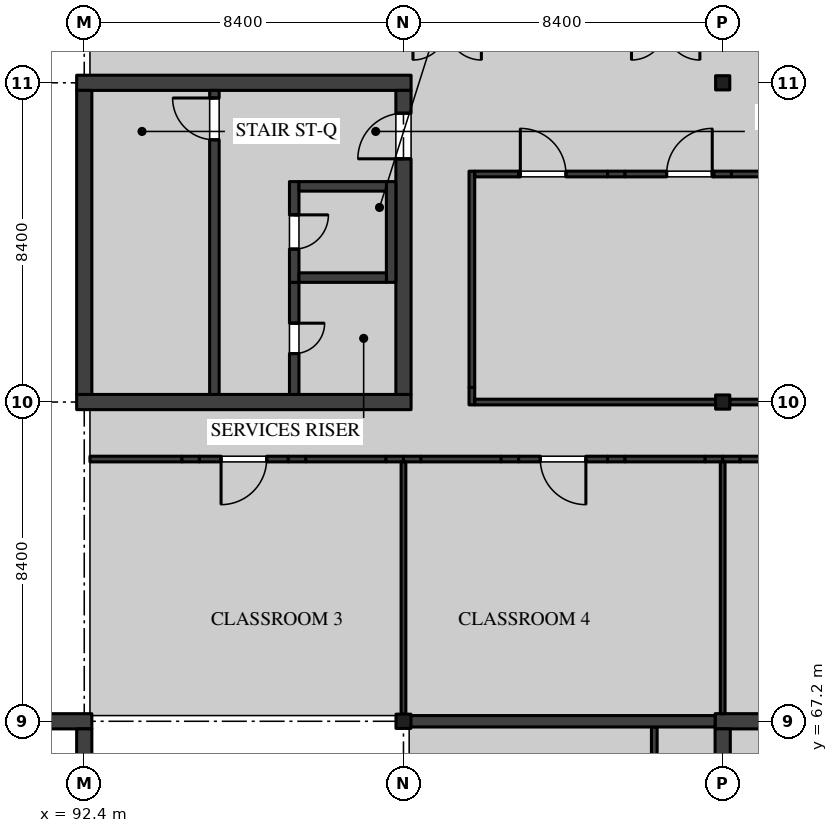
"""IFC4 building model, lengths in metres.
Left out: names, types, materials, properties, quantities, classifications, styles, units other than length and angle.
Written with IfcOpenShell. Run it as: python <this file> out.ifc"""

import sys

from ifc_helpers import new_model, si_unit, direction, frame, frame_2d, origin, origin_2d, place, context, subcontext, project, spatial, rectangle, i_section, extrude, element, fill, save


model = new_model("IFC4")
c1 = context("Model", 3, precision=1e-05, world=origin(), true_north=direction((0.0, 1.0)))
c2 = subcontext(c1, "Body", "Model", "MODEL_VIEW")
j1 = project(units=[si_unit("LENGTHUNIT", "METRE"), si_unit("PLANEANGLEUNIT", "RADIAN")], contexts=[c1])
p1 = place(None, origin())
s1 = spatial("IfcSite", under=j1, at=p1, CompositionType="ELEMENT")
p2 = place(p1, origin())
s2 = spatial("IfcBuilding", under=s1, at=p2, CompositionType="ELEMENT")
p3 = place(p2, frame((0.0, 0.0, 9.9)))
s3 = spatial("IfcBuildingStorey", under=s2, at=p3, CompositionType="ELEMENT", Elevation=9.9)
p4 = place(p3, frame((100.8, 67.2, 0.0), z_axis=(0.0, 0.0, 1.0), x_axis=(1.0, 0.0, 0.0)))
e1 = element("IfcColumn", 1, at=p4, inside=s3, PredefinedType="COLUMN", context=c2, shape_type="SweptSolid", body=[
    extrude(i_section(OverallWidth=0.394, OverallDepth=0.376, WebThickness=0.017, FlangeThickness=0.028, FilletRadius=0.015, at=origin_2d()), origin(), (0.0, 0.0, 1.0), 4.37),
])
for number, where, z_axis, x_axis in (
    (2, (109.2, 75.6, 0.0), (0.0, 0.0, 1.0), (1.0, 0.0, 0.0)),
    (3, (109.2, 84.0, 0.0), (0.0, 0.0, 1.0), (1.0, 0.0, 0.0)),
):
    element("IfcColumn", number, at=place(p3, frame(where, z_axis=z_axis, x_axis=x_axis)), inside=s3, PredefinedType="COLUMN", context=c2, shape_type="SweptSolid", body=[
        extrude(i_section(OverallWidth=0.373, OverallDepth=0.373, WebThickness=0.016, FlangeThickness=0.026, FilletRadius=0.015, at=origin_2d()), origin(), (0.0, 0.0, 1.0), 4.37),
    ])
p5 = place(p3, frame((83.8, 67.2, 0.0), z_axis=(0.0, 0.0, 1.0), x_axis=(1.0, 0.0, 0.0)))
e4 = element("IfcWall", 4, at=p5, inside=s3, PredefinedType="SHEAR", context=c2, shape_type="SweptSolid", body=[
    extrude(rectangle(XDim=8.8, YDim=0.4, at=frame_2d((4.4, 0.0))), origin(), (0.0, 0.0, 1.0), 4.5),
])
p6 = place(p3, frame((92.4, 59.0, 0.0), z_axis=(0.0, 0.0, 1.0), x_axis=(0.0, 1.0, 0.0)))
e5 = element("IfcWall", 5, at=p6, inside=s3, PredefinedType="SHEAR", context=c2, shape_type="SweptSolid", body=[
    extrude(rectangle(XDim=8.0, YDim=0.4, at=frame_2d((4.0, 0.0))), origin(), (0.0, 0.0, 1.0), 4.5),
])
p7 = place(p3, frame((109.0, 67.2, 0.0), z_axis=(0.0, 0.0, 1.0), x_axis=(1.0, 0.0, 0.0)))
e6 = element("IfcWall", 6, at=p7, inside=s3, PredefinedType="SHEAR", context=c2, shape_type="SweptSolid", body=[
    extrude(rectangle(XDim=8.8, YDim=0.4, at=frame_2d((4.4, 0.0))), origin(), (0.0, 0.0, 1.0), 4.37),
])
p8 = place(p3, frame((109.2, 59.0, 0.0), z_axis=(0.0, 0.0, 1.0), x_axis=(0.0, 1.0, 0.0)))
e7 = element("IfcWall", 7, at=p8, inside=s3, PredefinedType="SHEAR", context=c2, shape_type="SweptSolid", body=[
    extrude(rectangle(XDim=8.0, YDim=0.4, at=frame_2d((4.0, 0.0))), origin(), (0.0, 0.0, 1.0), 4.37),
])
p9 = place(p8, frame((2.925, 0.0, 0.0)))
e8 = element("IfcOpeningElement", 8, at=p9, cuts=e7, PredefinedType="OPENING", context=c2, shape_type="SweptSolid", body=[
    extrude(rectangle(XDim=1.2, YDim=2.1, at=frame_2d((0.6, 1.05))), frame((0.0, 0.21, 0.0), z_axis=(0.0, -1.0, 0.0), x_axis=(1.0, 0.0, 0.0)), (0.0, 0.0, 1.0), 0.42),
])
for number, where, z_axis, x_axis in (
    (9, (92.2, 75.6, 0.0), (0.0, 0.0, 1.0), (1.0, 0.0, 0.0)),
    (10, (92.2, 84.0, 0.0), (0.0, 0.0, 1.0), (1.0, 0.0, 0.0)),
):
    element("IfcWall", number, at=place(p3, frame(where, z_axis=z_axis, x_axis=x_axis)), inside=s3, PredefinedType="SHEAR", context=c2, shape_type="SweptSolid", body=[
        extrude(rectangle(XDim=8.8, YDim=0.4, at=frame_2d((4.4, 0.0))), origin(), (0.0, 0.0, 1.0), 4.37),
    ])
p10 = place(p3, frame((92.4, 75.8, 0.0), z_axis=(0.0, 0.0, 1.0), x_axis=(0.0, 1.0, 0.0)))
e11 = element("IfcWall", 11, at=p10, inside=s3, PredefinedType="SHEAR", context=c2, shape_type="SweptSolid", body=[
    extrude(rectangle(XDim=8.0, YDim=0.4, at=frame_2d((4.0, 0.0))), origin(), (0.0, 0.0, 1.0), 4.37),
])
p11 = place(p3, frame((100.8, 75.8, 0.0), z_axis=(0.0, 0.0, 1.0), x_axis=(0.0, 1.0, 0.0)))
e12 = element("IfcWall", 12, at=p11, inside=s3, PredefinedType="SHEAR", context=c2, shape_type="SweptSolid", body=[
    extrude(rectangle(XDim=8.0, YDim=0.4, at=frame_2d((4.0, 0.0))), origin(), (0.0, 0.0, 1.0), 4.37),
])
p12 = place(p11, frame((6.2, 0.0, 0.0)))
e13 = element("IfcOpeningElement", 13, at=p12, cuts=e12, PredefinedType="OPENING", context=c2, shape_type="SweptSolid", body=[
    extrude(rectangle(XDim=1.2, YDim=2.1, at=frame_2d((0.6, 1.05))), frame((0.0, 0.21, 0.0), z_axis=(0.0, -1.0, 0.0), x_axis=(1.0, 0.0, 0.0)), (0.0, 0.0, 1.0), 0.42),
])
p13 = place(p3, frame((95.825, 83.8, 0.0), z_axis=(0.0, 0.0, 1.0), x_axis=(0.0, -1.0, 0.0)))
e14 = element("IfcWall", 14, at=p13, inside=s3, PredefinedType="SOLIDWALL", context=c2, shape_type="SweptSolid", body=[
    extrude(rectangle(XDim=8.0, YDim=0.25, at=frame_2d((4.0, 0.0))), origin(), (0.0, 0.0, 1.0), 4.37),
])
p14 = place(p13, frame((0.2, 0.0, 0.0)))
e15 = element("IfcOpeningElement", 15, at=p14, cuts=e14, PredefinedType="OPENING", context=c2, shape_type="SweptSolid", body=[
    extrude(rectangle(XDim=1.1, YDim=2.1, at=frame_2d((0.55, 1.05))), frame((0.0, 0.135, 0.0), z_axis=(0.0, -1.0, 0.0), x_axis=(1.0, 0.0, 0.0)), (0.0, 0.0, 1.0), 0.27),
])
p15 = place(p3, frame((97.925, 78.75, 0.0), z_axis=(0.0, 0.0, 1.0), x_axis=(0.0, -1.0, 0.0)))
e16 = element("IfcWall", 16, at=p15, inside=s3, PredefinedType="SOLIDWALL", context=c2, shape_type="SweptSolid", body=[
    extrude(rectangle(XDim=2.95, YDim=0.25, at=frame_2d((1.475, 0.0))), origin(), (0.0, 0.0, 1.0), 4.37),
])
p16 = place(p15, frame((1.075, 0.0, 0.0)))
e17 = element("IfcOpeningElement", 17, at=p16, cuts=e16, PredefinedType="OPENING", context=c2, shape_type="SweptSolid", body=[
    extrude(rectangle(XDim=0.8, YDim=2.1, at=frame_2d((0.4, 1.05))), frame((0.0, 0.135, 0.0), z_axis=(0.0, -1.0, 0.0), x_axis=(1.0, 0.0, 0.0)), (0.0, 0.0, 1.0), 0.27),
])
p17 = place(p3, frame((97.925, 81.4, 0.0), z_axis=(0.0, 0.0, 1.0), x_axis=(0.0, -1.0, 0.0)))
e18 = element("IfcWall", 18, at=p17, inside=s3, PredefinedType="SOLIDWALL", context=c2, shape_type="SweptSolid", body=[
    extrude(rectangle(XDim=2.65, YDim=0.25, at=frame_2d((1.325, 0.0))), origin(), (0.0, 0.0, 1.0), 4.37),
])
p18 = place(p17, frame((0.875, 0.0, 0.0)))
e19 = element("IfcOpeningElement", 19, at=p18, cuts=e18, PredefinedType="OPENING", context=c2, shape_type="SweptSolid", body=[
    extrude(rectangle(XDim=0.9, YDim=2.1, at=frame_2d((0.45, 1.05))), frame((0.0, 0.135, 0.0), z_axis=(0.0, -1.0, 0.0), x_axis=(1.0, 0.0, 0.0)), (0.0, 0.0, 1.0), 0.27),
])
p19 = place(p3, frame((100.475, 81.4, 0.0), z_axis=(0.0, 0.0, 1.0), x_axis=(0.0, -1.0, 0.0)))
e20 = element("IfcWall", 20, at=p19, inside=s3, PredefinedType="SOLIDWALL", context=c2, shape_type="SweptSolid", body=[
    extrude(rectangle(XDim=2.65, YDim=0.25, at=frame_2d((1.325, 0.0))), origin(), (0.0, 0.0, 1.0), 4.37),
])
for number, where, z_axis, x_axis in (
    (21, (98.05, 81.275, 0.0), (0.0, 0.0, 1.0), (1.0, 0.0, 0.0)),
    (22, (98.05, 78.875, 0.0), (0.0, 0.0, 1.0), (1.0, 0.0, 0.0)),
):
    element("IfcWall", number, at=place(p3, frame(where, z_axis=z_axis, x_axis=x_axis)), inside=s3, PredefinedType="SOLIDWALL", context=c2, shape_type="SweptSolid", body=[
        extrude(rectangle(XDim=2.3, YDim=0.25, at=frame_2d((1.15, 0.0))), origin(), (0.0, 0.0, 1.0), 4.37),
    ])
p20 = place(p3, frame((107.4, 59.03, 0.0), z_axis=(0.0, 0.0, 1.0), x_axis=(0.0, 1.0, 0.0)))
e23 = element("IfcWall", 23, at=p20, inside=s3, PredefinedType="PARTITIONING", context=c2, shape_type="SweptSolid", body=[
    extrude(rectangle(XDim=8.02, YDim=0.15, at=frame_2d((4.01, 0.0))), origin(), (0.0, 0.0, 1.0), 4.37),
])
p21 = place(p3, frame((102.6, 75.525, 0.0), z_axis=(0.0, 0.0, 1.0), x_axis=(0.0, 1.0, 0.0)))
e24 = element("IfcWall", 24, at=p21, inside=s3, PredefinedType="PARTITIONING", context=c2, shape_type="SweptSolid", body=[
    extrude(rectangle(XDim=0.46, YDim=0.15, at=frame_2d((0.23, 0.0))), origin(), (0.0, 0.0, 1.0), 3.746),
])
p22 = place(p3, frame((102.6, 75.985, 0.0), z_axis=(0.0, 0.0, 1.0), x_axis=(0.0, 1.0, 0.0)))
e25 = element("IfcWall", 25, at=p22, inside=s3, PredefinedType="PARTITIONING", context=c2, shape_type="SweptSolid", body=[
    extrude(rectangle(XDim=5.69, YDim=0.15, at=frame_2d((2.845, 0.0))), origin(), (0.0, 0.0, 1.0), 4.37),
])
p23 = place(p3, frame((102.675, 75.6, 0.0), z_axis=(0.0, 0.0, 1.0), x_axis=(1.0, 0.0, 0.0)))
e26 = element("IfcWall", 26, at=p23, inside=s3, PredefinedType="PARTITIONING", context=c2, shape_type="SweptSolid", body=[
    extrude(rectangle(XDim=6.339, YDim=0.15, at=frame_2d((3.169, 0.0))), origin(), (0.0, 0.0, 1.0), 3.746),
])
p24 = place(p3, frame((109.386, 75.6, 0.0), z_axis=(0.0, 0.0, 1.0), x_axis=(1.0, 0.0, 0.0)))
e27 = element("IfcWall", 27, at=p24, inside=s3, PredefinedType="PARTITIONING", context=c2, shape_type="SweptSolid", body=[
    extrude(rectangle(XDim=6.414, YDim=0.15, at=frame_2d((3.207, 0.0))), origin(), (0.0, 0.0, 1.0), 3.746),
])
p25 = place(p3, frame((102.675, 81.6, 0.0), z_axis=(0.0, 0.0, 1.0), x_axis=(1.0, 0.0, 0.0)))
e28 = element("IfcWall", 28, at=p25, inside=s3, PredefinedType="PARTITIONING", context=c2, shape_type="SweptSolid", body=[
    extrude(rectangle(XDim=1.155, YDim=0.15, at=frame_2d((0.578, 0.0))), origin(), (0.0, 0.0, 1.0), 3.895),
])
p26 = place(p3, frame((103.83, 81.6, 0.0), z_axis=(0.0, 0.0, 1.0), x_axis=(1.0, 0.0, 0.0)))
e29 = element("IfcWall", 29, at=p26, inside=s3, PredefinedType="PARTITIONING", context=c2, shape_type="SweptSolid", body=[
    extrude(rectangle(XDim=2.34, YDim=0.15, at=frame_2d((1.17, 0.0))), origin(), (0.0, 0.0, 1.0), 4.37),
])
p27 = place(p26, frame((0.045, 0.0, 0.0)))
e30 = element("IfcOpeningElement", 30, at=p27, cuts=e29, PredefinedType="OPENING", context=c2, shape_type="SweptSolid", body=[
    extrude(rectangle(XDim=1.2, YDim=2.4, at=frame_2d((0.6, 1.2))), frame((0.0, 0.085, 0.0), z_axis=(0.0, -1.0, 0.0), x_axis=(1.0, 0.0, 0.0)), (0.0, 0.0, 1.0), 0.17),
])
p28 = place(p3, frame((106.17, 81.6, 0.0), z_axis=(0.0, 0.0, 1.0), x_axis=(1.0, 0.0, 0.0)))
e31 = element("IfcWall", 31, at=p28, inside=s3, PredefinedType="PARTITIONING", context=c2, shape_type="SweptSolid", body=[
    extrude(rectangle(XDim=0.46, YDim=0.15, at=frame_2d((0.23, 0.0))), origin(), (0.0, 0.0, 1.0), 3.895),
])
p29 = place(p3, frame((106.63, 81.6, 0.0), z_axis=(0.0, 0.0, 1.0), x_axis=(1.0, 0.0, 0.0)))
e32 = element("IfcWall", 32, at=p29, inside=s3, PredefinedType="PARTITIONING", context=c2, shape_type="SweptSolid", body=[
    extrude(rectangle(XDim=2.34, YDim=0.15, at=frame_2d((1.17, 0.0))), origin(), (0.0, 0.0, 1.0), 4.37),
])
p30 = place(p29, frame((1.095, 0.0, 0.0)))
e33 = element("IfcOpeningElement", 33, at=p30, cuts=e32, PredefinedType="OPENING", context=c2, shape_type="SweptSolid", body=[
    extrude(rectangle(XDim=1.2, YDim=2.4, at=frame_2d((0.6, 1.2))), frame((0.0, 0.085, 0.0), z_axis=(0.0, -1.0, 0.0), x_axis=(1.0, 0.0, 0.0)), (0.0, 0.0, 1.0), 0.17),
])
p31 = place(p3, frame((108.97, 81.6, 0.0), z_axis=(0.0, 0.0, 1.0), x_axis=(1.0, 0.0, 0.0)))
e34 = element("IfcWall", 34, at=p31, inside=s3, PredefinedType="PARTITIONING", context=c2, shape_type="SweptSolid", body=[
    extrude(rectangle(XDim=0.46, YDim=0.15, at=frame_2d((0.23, 0.0))), origin(), (0.0, 0.0, 1.0), 3.746),
])
p32 = place(p3, frame((109.43, 81.6, 0.0), z_axis=(0.0, 0.0, 1.0), x_axis=(1.0, 0.0, 0.0)))
e35 = element("IfcWall", 35, at=p32, inside=s3, PredefinedType="PARTITIONING", context=c2, shape_type="SweptSolid", body=[
    extrude(rectangle(XDim=2.34, YDim=0.15, at=frame_2d((1.17, 0.0))), origin(), (0.0, 0.0, 1.0), 4.37),
])
p33 = place(p3, frame((92.55, 74.1, 0.0), z_axis=(0.0, 0.0, 1.0), x_axis=(1.0, 0.0, 0.0)))
e36 = element("IfcWall", 36, at=p33, inside=s3, PredefinedType="PARTITIONING", context=c2, shape_type="SweptSolid", body=[
    extrude(rectangle(XDim=2.42, YDim=0.15, at=frame_2d((1.21, 0.0))), origin(), (0.0, 0.0, 1.0), 4.37),
])
p34 = place(p3, frame((94.97, 74.1, 0.0), z_axis=(0.0, 0.0, 1.0), x_axis=(1.0, 0.0, 0.0)))
e37 = element("IfcWall", 37, at=p34, inside=s3, PredefinedType="PARTITIONING", context=c2, shape_type="SweptSolid", body=[
    extrude(rectangle(XDim=0.46, YDim=0.15, at=frame_2d((0.23, 0.0))), origin(), (0.0, 0.0, 1.0), 3.895),
])
p35 = place(p3, frame((95.43, 74.1, 0.0), z_axis=(0.0, 0.0, 1.0), x_axis=(1.0, 0.0, 0.0)))
e38 = element("IfcWall", 38, at=p35, inside=s3, PredefinedType="PARTITIONING", context=c2, shape_type="SweptSolid", body=[
    extrude(rectangle(XDim=2.34, YDim=0.15, at=frame_2d((1.17, 0.0))), origin(), (0.0, 0.0, 1.0), 4.37),
])
p36 = place(p35, frame((0.57, 0.0, 0.0)))
e39 = element("IfcOpeningElement", 39, at=p36, cuts=e38, PredefinedType="OPENING", context=c2, shape_type="SweptSolid", body=[
    extrude(rectangle(XDim=1.2, YDim=2.4, at=frame_2d((0.6, 1.2))), frame((0.0, 0.085, 0.0), z_axis=(0.0, -1.0, 0.0), x_axis=(1.0, 0.0, 0.0)), (0.0, 0.0, 1.0), 0.17),
])
p37 = place(p3, frame((97.77, 74.1, 0.0), z_axis=(0.0, 0.0, 1.0), x_axis=(1.0, 0.0, 0.0)))
e40 = element("IfcWall", 40, at=p37, inside=s3, PredefinedType="PARTITIONING", context=c2, shape_type="SweptSolid", body=[
    extrude(rectangle(XDim=0.46, YDim=0.15, at=frame_2d((0.23, 0.0))), origin(), (0.0, 0.0, 1.0), 3.895),
])
p38 = place(p3, frame((98.23, 74.1, 0.0), z_axis=(0.0, 0.0, 1.0), x_axis=(1.0, 0.0, 0.0)))
e41 = element("IfcWall", 41, at=p38, inside=s3, PredefinedType="PARTITIONING", context=c2, shape_type="SweptSolid", body=[
    extrude(rectangle(XDim=2.11, YDim=0.15, at=frame_2d((1.055, 0.0))), origin(), (0.0, 0.0, 1.0), 4.37),
])
for number, where, z_axis, x_axis in (
    (42, (100.34, 74.1, 0.0), (0.0, 0.0, 1.0), (1.0, 0.0, 0.0)),
    (43, (100.8, 74.1, 0.0), (0.0, 0.0, 1.0), (1.0, 0.0, 0.0)),
):
    element("IfcWall", number, at=place(p3, frame(where, z_axis=z_axis, x_axis=x_axis)), inside=s3, PredefinedType="PARTITIONING", context=c2, shape_type="SweptSolid", body=[
        extrude(rectangle(XDim=0.46, YDim=0.15, at=frame_2d((0.23, 0.0))), origin(), (0.0, 0.0, 1.0), 3.746),
    ])
p39 = place(p3, frame((101.26, 74.1, 0.0), z_axis=(0.0, 0.0, 1.0), x_axis=(1.0, 0.0, 0.0)))
e44 = element("IfcWall", 44, at=p39, inside=s3, PredefinedType="PARTITIONING", context=c2, shape_type="SweptSolid", body=[
    extrude(rectangle(XDim=2.11, YDim=0.15, at=frame_2d((1.055, 0.0))), origin(), (0.0, 0.0, 1.0), 4.37),
])
p40 = place(p3, frame((103.37, 74.1, 0.0), z_axis=(0.0, 0.0, 1.0), x_axis=(1.0, 0.0, 0.0)))
e45 = element("IfcWall", 45, at=p40, inside=s3, PredefinedType="PARTITIONING", context=c2, shape_type="SweptSolid", body=[
    extrude(rectangle(XDim=0.46, YDim=0.15, at=frame_2d((0.23, 0.0))), origin(), (0.0, 0.0, 1.0), 3.895),
])
p41 = place(p3, frame((103.83, 74.1, 0.0), z_axis=(0.0, 0.0, 1.0), x_axis=(1.0, 0.0, 0.0)))
e46 = element("IfcWall", 46, at=p41, inside=s3, PredefinedType="PARTITIONING", context=c2, shape_type="SweptSolid", body=[
    extrude(rectangle(XDim=2.34, YDim=0.15, at=frame_2d((1.17, 0.0))), origin(), (0.0, 0.0, 1.0), 4.37),
])
p42 = place(p41, frame((0.57, 0.0, 0.0)))
e47 = element("IfcOpeningElement", 47, at=p42, cuts=e46, PredefinedType="OPENING", context=c2, shape_type="SweptSolid", body=[
    extrude(rectangle(XDim=1.2, YDim=2.4, at=frame_2d((0.6, 1.2))), frame((0.0, 0.085, 0.0), z_axis=(0.0, -1.0, 0.0), x_axis=(1.0, 0.0, 0.0)), (0.0, 0.0, 1.0), 0.17),
])
p43 = place(p3, frame((106.17, 74.1, 0.0), z_axis=(0.0, 0.0, 1.0), x_axis=(1.0, 0.0, 0.0)))
e48 = element("IfcWall", 48, at=p43, inside=s3, PredefinedType="PARTITIONING", context=c2, shape_type="SweptSolid", body=[
    extrude(rectangle(XDim=0.46, YDim=0.15, at=frame_2d((0.23, 0.0))), origin(), (0.0, 0.0, 1.0), 3.895),
])
p44 = place(p3, frame((106.63, 74.1, 0.0), z_axis=(0.0, 0.0, 1.0), x_axis=(1.0, 0.0, 0.0)))
e49 = element("IfcWall", 49, at=p44, inside=s3, PredefinedType="PARTITIONING", context=c2, shape_type="SweptSolid", body=[
    extrude(rectangle(XDim=2.11, YDim=0.15, at=frame_2d((1.055, 0.0))), origin(), (0.0, 0.0, 1.0), 4.37),
])
for number, where, z_axis, x_axis in (
    (50, (108.74, 74.1, 0.0), (0.0, 0.0, 1.0), (1.0, 0.0, 0.0)),
    (51, (109.2, 74.1, 0.0), (0.0, 0.0, 1.0), (1.0, 0.0, 0.0)),
):
    element("IfcWall", number, at=place(p3, frame(where, z_axis=z_axis, x_axis=x_axis)), inside=s3, PredefinedType="PARTITIONING", context=c2, shape_type="SweptSolid", body=[
        extrude(rectangle(XDim=0.46, YDim=0.15, at=frame_2d((0.23, 0.0))), origin(), (0.0, 0.0, 1.0), 3.746),
    ])
p45 = place(p3, frame((109.66, 74.1, 0.0), z_axis=(0.0, 0.0, 1.0), x_axis=(1.0, 0.0, 0.0)))
e52 = element("IfcWall", 52, at=p45, inside=s3, PredefinedType="PARTITIONING", context=c2, shape_type="SweptSolid", body=[
    extrude(rectangle(XDim=2.11, YDim=0.15, at=frame_2d((1.055, 0.0))), origin(), (0.0, 0.0, 1.0), 4.37),
])
p46 = place(p3, frame((100.8, 67.388, 0.0), z_axis=(0.0, 0.0, 1.0), x_axis=(0.0, 1.0, 0.0)))
e53 = element("IfcWall", 53, at=p46, inside=s3, PredefinedType="PARTITIONING", context=c2, shape_type="SweptSolid", body=[
    extrude(rectangle(XDim=6.637, YDim=0.125, at=frame_2d((3.318, 0.0))), origin(), (0.0, 0.0, 1.0), 3.746),
])
p47 = place(p3, frame((109.2, 67.4, 0.0), z_axis=(0.0, 0.0, 1.0), x_axis=(0.0, 1.0, 0.0)))
e54 = element("IfcWall", 54, at=p47, inside=s3, PredefinedType="PARTITIONING", context=c2, shape_type="SweptSolid", body=[
    extrude(rectangle(XDim=6.625, YDim=0.125, at=frame_2d((3.312, 0.0))), origin(), (0.0, 0.0, 1.0), 3.746),
])
p48 = place(p3, frame((109.0, 67.2, 0.0), z_axis=(0.0, 0.0, 1.0), x_axis=(-1.0, 0.0, 0.0)))
e55 = element("IfcWall", 55, at=p48, inside=s3, PredefinedType="SOLIDWALL", context=c2, shape_type="SweptSolid", body=[
    extrude(rectangle(XDim=8.198, YDim=0.3, at=frame_2d((4.099, 0.0))), origin(), (0.0, 0.0, 1.0), 3.746),
])
p49 = place(p12, origin())
e56 = element("IfcDoor", 56, at=p49, inside=s3, OperationType="SINGLE_SWING_RIGHT", PredefinedType="DOOR", context=c2, shape_type="SweptSolid", body=[
    extrude(rectangle(XDim=1.2, YDim=2.1, at=frame_2d((0.6, 1.05))), frame((0.0, 0.035, 0.0), z_axis=(0.0, -1.0, 0.0), x_axis=(1.0, 0.0, 0.0)), (0.0, 0.0, 1.0), 0.07),
])
fill(e13, e56)
p50 = place(p18, origin())
e57 = element("IfcDoor", 57, at=p50, inside=s3, OperationType="SINGLE_SWING_RIGHT", PredefinedType="DOOR", context=c2, shape_type="SweptSolid", body=[
    extrude(rectangle(XDim=0.9, YDim=2.1, at=frame_2d((0.45, 1.05))), frame((0.0, 0.035, 0.0), z_axis=(0.0, -1.0, 0.0), x_axis=(1.0, 0.0, 0.0)), (0.0, 0.0, 1.0), 0.07),
])
fill(e19, e57)
p51 = place(p16, origin())
e58 = element("IfcDoor", 58, at=p51, inside=s3, OperationType="SINGLE_SWING_RIGHT", PredefinedType="DOOR", context=c2, shape_type="SweptSolid", body=[
    extrude(rectangle(XDim=0.8, YDim=2.1, at=frame_2d((0.4, 1.05))), frame((0.0, 0.035, 0.0), z_axis=(0.0, -1.0, 0.0), x_axis=(1.0, 0.0, 0.0)), (0.0, 0.0, 1.0), 0.07),
])
fill(e17, e58)
p52 = place(p14, frame((1.1, 0.0, 0.0), z_axis=(0.0, 0.0, 1.0), x_axis=(-1.0, 0.0, 0.0)))
e59 = element("IfcDoor", 59, at=p52, inside=s3, OperationType="SINGLE_SWING_LEFT", PredefinedType="DOOR", context=c2, shape_type="SweptSolid", body=[
    extrude(rectangle(XDim=1.1, YDim=2.1, at=frame_2d((0.55, 1.05))), frame((0.0, 0.035, 0.0), z_axis=(0.0, -1.0, 0.0), x_axis=(1.0, 0.0, 0.0)), (0.0, 0.0, 1.0), 0.07),
])
fill(e15, e59)
p53 = place(p27, origin())
e60 = element("IfcDoor", 60, at=p53, inside=s3, OperationType="SINGLE_SWING_RIGHT", PredefinedType="DOOR", context=c2, shape_type="SweptSolid", body=[
    extrude(rectangle(XDim=1.2, YDim=2.4, at=frame_2d((0.6, 1.2))), frame((0.0, 0.025, 0.0), z_axis=(0.0, -1.0, 0.0), x_axis=(1.0, 0.0, 0.0)), (0.0, 0.0, 1.0), 0.05),
])
fill(e30, e60)
p54 = place(p30, origin())
e61 = element("IfcDoor", 61, at=p54, inside=s3, OperationType="SINGLE_SWING_LEFT", PredefinedType="DOOR", context=c2, shape_type="SweptSolid", body=[
    extrude(rectangle(XDim=1.2, YDim=2.4, at=frame_2d((0.6, 1.2))), frame((0.0, 0.025, 0.0), z_axis=(0.0, -1.0, 0.0), x_axis=(1.0, 0.0, 0.0)), (0.0, 0.0, 1.0), 0.05),
])
fill(e33, e61)
p55 = place(p36, frame((1.2, 0.0, 0.0), z_axis=(0.0, 0.0, 1.0), x_axis=(-1.0, 0.0, 0.0)))
e62 = element("IfcDoor", 62, at=p55, inside=s3, OperationType="SINGLE_SWING_LEFT", PredefinedType="DOOR", context=c2, shape_type="SweptSolid", body=[
    extrude(rectangle(XDim=1.2, YDim=2.4, at=frame_2d((0.6, 1.2))), frame((0.0, 0.025, 0.0), z_axis=(0.0, -1.0, 0.0), x_axis=(1.0, 0.0, 0.0)), (0.0, 0.0, 1.0), 0.05),
])
fill(e39, e62)
p56 = place(p42, frame((1.2, 0.0, 0.0), z_axis=(0.0, 0.0, 1.0), x_axis=(-1.0, 0.0, 0.0)))
e63 = element("IfcDoor", 63, at=p56, inside=s3, OperationType="SINGLE_SWING_RIGHT", PredefinedType="DOOR", context=c2, shape_type="SweptSolid", body=[
    extrude(rectangle(XDim=1.2, YDim=2.4, at=frame_2d((0.6, 1.2))), frame((0.0, 0.025, 0.0), z_axis=(0.0, -1.0, 0.0), x_axis=(1.0, 0.0, 0.0)), (0.0, 0.0, 1.0), 0.05),
])
fill(e47, e63)
save(model, sys.argv[1])
